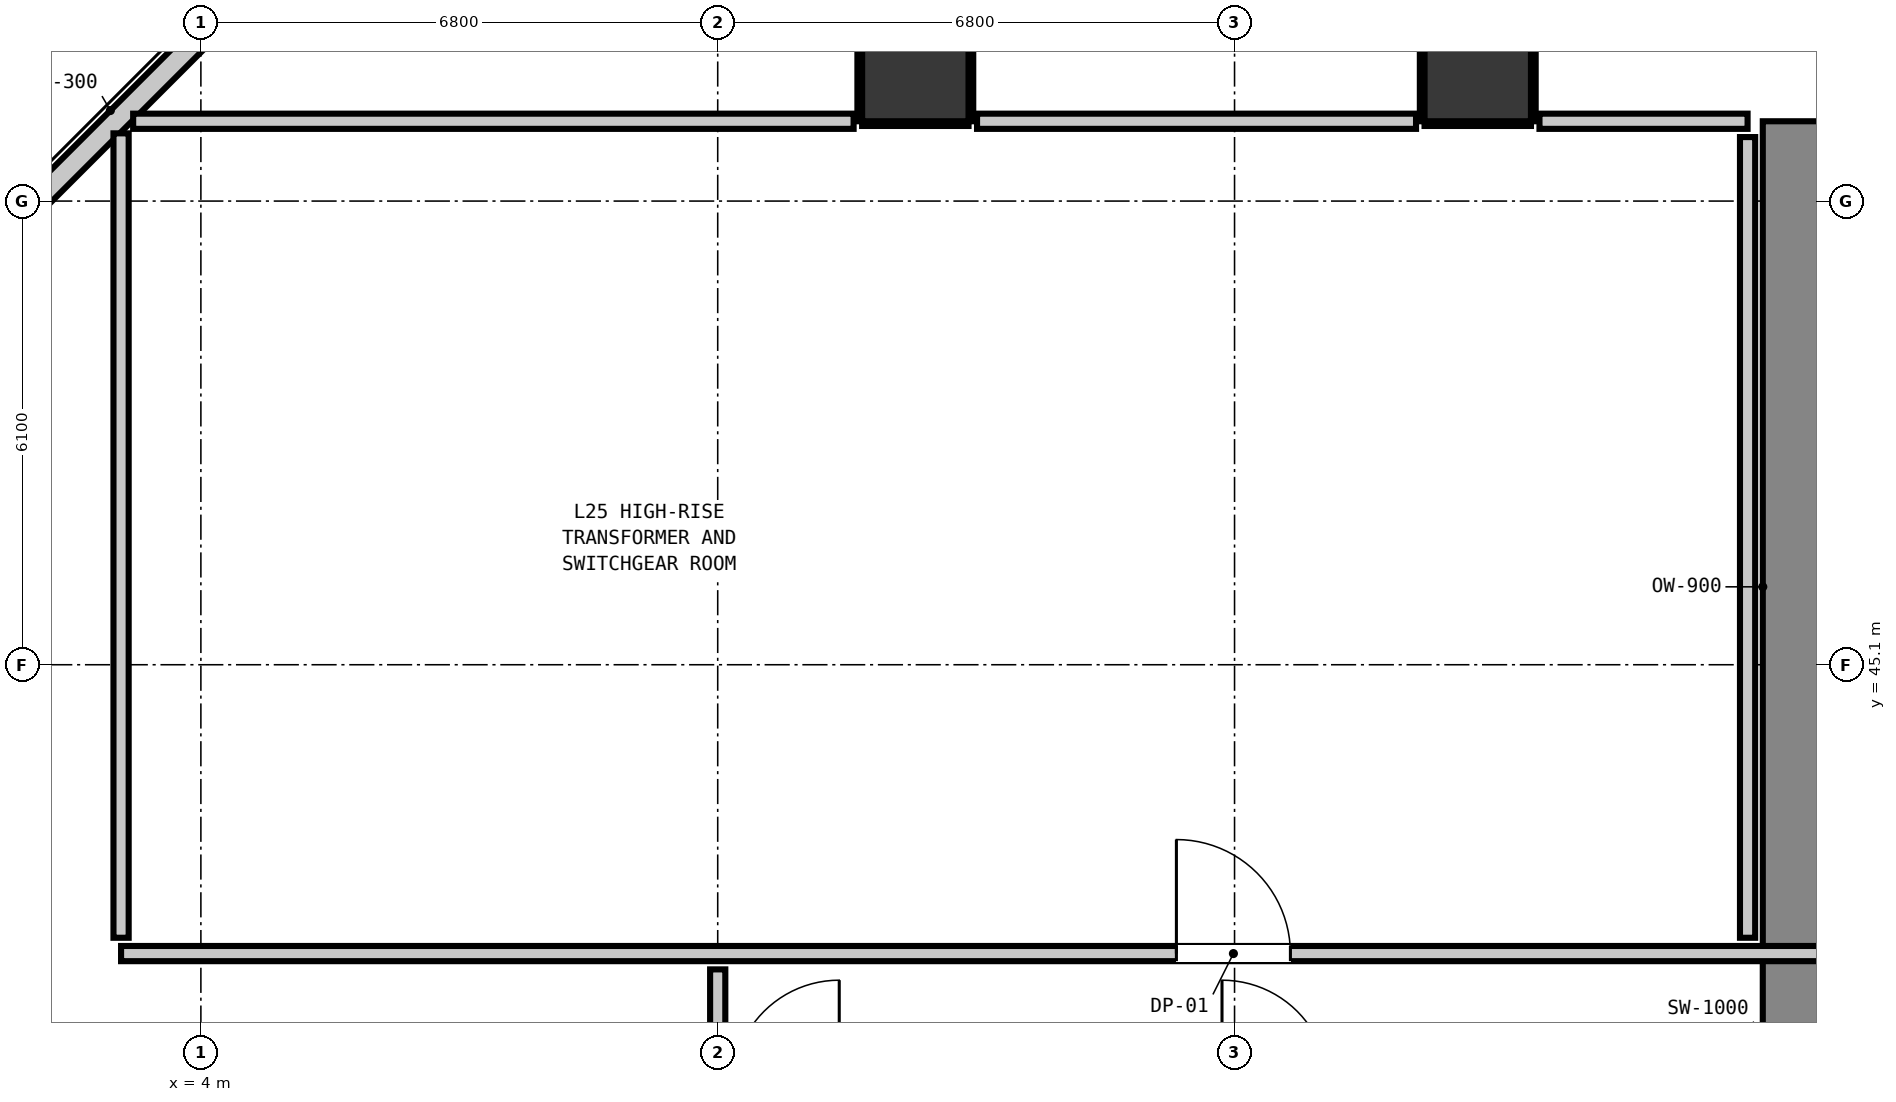
"""IFC4 building model, lengths in metres.
Left out: names, types, materials, properties, quantities, classifications, styles, units other than length and angle.
Written with IfcOpenShell. Run it as: python <this file> out.ifc"""

import sys

from ifc_helpers import new_model, si_unit, direction, frame, frame_2d, origin, origin_2d, place, context, subcontext, project, spatial, rectangle, extrude, element, fill, save


model = new_model("IFC4")
c1 = context("Model", 3, precision=1e-05, world=origin(), true_north=direction((0.0, 1.0)))
c2 = subcontext(c1, "Body", "Model", "MODEL_VIEW")
j1 = project(units=[si_unit("LENGTHUNIT", "METRE"), si_unit("PLANEANGLEUNIT", "RADIAN")], contexts=[c1])
p1 = place(None, origin())
s1 = spatial("IfcSite", under=j1, at=p1, CompositionType="ELEMENT")
p2 = place(p1, origin())
s2 = spatial("IfcBuilding", under=s1, at=p2, CompositionType="ELEMENT")
p3 = place(p2, frame((0.0, 0.0, 88.4)))
s3 = spatial("IfcBuildingStorey", under=s2, at=p3, CompositionType="ELEMENT", Elevation=88.4)
for number, where, z_axis, x_axis in (
    (1, (13.4, 52.95, 0.0), (0.0, 0.0, 1.0), (1.0, 0.0, 0.0)),
    (2, (20.8, 52.95, 0.0), (0.0, 0.0, 1.0), (1.0, 0.0, 0.0)),
):
    element("IfcColumn", number, at=place(p3, frame(where, z_axis=z_axis, x_axis=x_axis)), inside=s3, PredefinedType="COLUMN", context=c2, shape_type="SweptSolid", body=[
        extrude(rectangle(XDim=1.4, YDim=1.4, at=origin_2d()), origin(), (0.0, 0.0, 1.0), 4.4),
    ])
p4 = place(p3, frame((25.0, 40.0, 0.0), z_axis=(0.0, 0.0, 1.0), x_axis=(0.0, 1.0, 0.0)))
e3 = element("IfcWall", 3, at=p4, inside=s3, PredefinedType="SHEAR", context=c2, shape_type="SweptSolid", body=[
    extrude(rectangle(XDim=12.25, YDim=0.9, at=frame_2d((6.125, 0.0))), origin(), (0.0, 0.0, 1.0), 4.14),
])
p5 = place(p3, frame((1.665, 51.035, 0.0), z_axis=(0.0, 0.0, 1.0), x_axis=(0.707106781187, 0.707106781187, 0.0)))
e4 = element("IfcWall", 4, at=p5, inside=s3, PredefinedType="STANDARD", context=c2, shape_type="SweptSolid", body=[
    extrude(rectangle(XDim=3.536, YDim=0.3, at=frame_2d((1.768, 0.0))), origin(), (0.0, 0.0, 1.0), 4.14),
])
p6 = place(p3, frame((2.95, 41.3, 0.0), z_axis=(0.0, 0.0, 1.0), x_axis=(1.0, 0.0, 0.0)))
e5 = element("IfcWall", 5, at=p6, inside=s3, PredefinedType="PARTITIONING", context=c2, shape_type="SweptSolid", body=[
    extrude(rectangle(XDim=39.9, YDim=0.2, at=frame_2d((19.95, 0.0))), origin(), (0.0, 0.0, 1.0), 4.14),
])
p7 = place(p6, frame((26.25, 0.0, 0.0)))
e6 = element("IfcOpeningElement", 6, at=p7, cuts=e5, PredefinedType="OPENING", context=c2, shape_type="SweptSolid", body=[
    extrude(rectangle(XDim=1.5, YDim=2.15, at=frame_2d((0.75, 1.075))), frame((0.0, 0.11, 0.0), z_axis=(0.0, -1.0, 0.0), x_axis=(1.0, 0.0, 0.0)), (0.0, 0.0, 1.0), 0.22),
])
p8 = place(p6, frame((32.965, 0.0, 0.0)))
e7 = element("IfcOpeningElement", 7, at=p8, cuts=e5, PredefinedType="OPENING", context=c2, shape_type="SweptSolid", body=[
    extrude(rectangle(XDim=1.5, YDim=2.15, at=frame_2d((0.75, 1.075))), frame((0.0, 0.11, 0.0), z_axis=(0.0, -1.0, 0.0), x_axis=(1.0, 0.0, 0.0)), (0.0, 0.0, 1.0), 0.22),
])
p9 = place(p6, frame((13.885, 0.0, 0.0)))
e8 = element("IfcOpeningElement", 8, at=p9, cuts=e5, PredefinedType="OPENING", context=c2, shape_type="SweptSolid", body=[
    extrude(rectangle(XDim=1.5, YDim=2.15, at=frame_2d((0.75, 1.075))), frame((0.0, 0.11, 0.0), z_axis=(0.0, -1.0, 0.0), x_axis=(1.0, 0.0, 0.0)), (0.0, 0.0, 1.0), 0.22),
])
p10 = place(p3, frame((3.109, 52.25, 0.0), z_axis=(0.0, 0.0, 1.0), x_axis=(1.0, 0.0, 0.0)))
e9 = element("IfcWall", 9, at=p10, inside=s3, PredefinedType="PARTITIONING", context=c2, shape_type="SweptSolid", body=[
    extrude(rectangle(XDim=9.479, YDim=0.2, at=frame_2d((4.74, 0.0))), origin(), (0.0, 0.0, 1.0), 4.14),
])
p11 = place(p3, frame((14.212, 52.25, 0.0), z_axis=(0.0, 0.0, 1.0), x_axis=(1.0, 0.0, 0.0)))
e10 = element("IfcWall", 10, at=p11, inside=s3, PredefinedType="PARTITIONING", context=c2, shape_type="SweptSolid", body=[
    extrude(rectangle(XDim=5.776, YDim=0.2, at=frame_2d((2.888, 0.0))), origin(), (0.0, 0.0, 1.0), 4.14),
])
p12 = place(p3, frame((21.612, 52.25, 0.0), z_axis=(0.0, 0.0, 1.0), x_axis=(1.0, 0.0, 0.0)))
e11 = element("IfcWall", 11, at=p12, inside=s3, PredefinedType="PARTITIONING", context=c2, shape_type="SweptSolid", body=[
    extrude(rectangle(XDim=2.738, YDim=0.2, at=frame_2d((1.369, 0.0))), origin(), (0.0, 0.0, 1.0), 4.14),
])
p13 = place(p3, frame((2.95, 41.508, 0.0), z_axis=(0.0, 0.0, 1.0), x_axis=(0.0, 1.0, 0.0)))
e12 = element("IfcWall", 12, at=p13, inside=s3, PredefinedType="PARTITIONING", context=c2, shape_type="SweptSolid", body=[
    extrude(rectangle(XDim=10.583, YDim=0.2, at=frame_2d((5.292, 0.0))), origin(), (0.0, 0.0, 1.0), 4.14),
])
p14 = place(p3, frame((10.8, 39.748, 0.0), z_axis=(0.0, 0.0, 1.0), x_axis=(0.0, 1.0, 0.0)))
e13 = element("IfcWall", 13, at=p14, inside=s3, PredefinedType="PARTITIONING", context=c2, shape_type="SweptSolid", body=[
    extrude(rectangle(XDim=1.344, YDim=0.2, at=frame_2d((0.672, 0.0))), origin(), (0.0, 0.0, 1.0), 4.14),
])
p15 = place(p3, frame((24.35, 41.508, 0.0), z_axis=(0.0, 0.0, 1.0), x_axis=(0.0, 1.0, 0.0)))
e14 = element("IfcWall", 14, at=p15, inside=s3, PredefinedType="PARTITIONING", context=c2, shape_type="SweptSolid", body=[
    extrude(rectangle(XDim=10.534, YDim=0.2, at=frame_2d((5.267, 0.0))), origin(), (0.0, 0.0, 1.0), 4.14),
])
p16 = place(p3, frame((12.7, 52.218, 0.0), z_axis=(0.0, 0.0, 1.0), x_axis=(1.0, 0.0, 0.0)))
e15 = element("IfcWall", 15, at=p16, inside=s3, PredefinedType="PARTITIONING", context=c2, shape_type="SweptSolid", body=[
    extrude(rectangle(XDim=1.4, YDim=0.06, at=frame_2d((0.7, 0.0))), origin(), (0.0, 0.0, 1.0), 1.45),
])
for number, where, z_axis, x_axis in (
    (16, (12.668, 52.25, 0.0), (0.0, 0.0, 1.0), (0.0, 1.0, 0.0)),
    (17, (14.132, 52.25, 0.0), (0.0, 0.0, 1.0), (0.0, 1.0, 0.0)),
):
    element("IfcWall", number, at=place(p3, frame(where, z_axis=z_axis, x_axis=x_axis)), inside=s3, PredefinedType="PARTITIONING", context=c2, shape_type="SweptSolid", body=[
        extrude(rectangle(XDim=1.12, YDim=0.06, at=frame_2d((0.56, 0.0))), origin(), (0.0, 0.0, 1.0), 1.45),
    ])
p17 = place(p3, frame((20.1, 52.218, 0.0), z_axis=(0.0, 0.0, 1.0), x_axis=(1.0, 0.0, 0.0)))
e18 = element("IfcWall", 18, at=p17, inside=s3, PredefinedType="PARTITIONING", context=c2, shape_type="SweptSolid", body=[
    extrude(rectangle(XDim=1.4, YDim=0.06, at=frame_2d((0.7, 0.0))), origin(), (0.0, 0.0, 1.0), 1.45),
])
for number, where, z_axis, x_axis in (
    (19, (20.068, 52.25, 0.0), (0.0, 0.0, 1.0), (0.0, 1.0, 0.0)),
    (20, (21.532, 52.25, 0.0), (0.0, 0.0, 1.0), (0.0, 1.0, 0.0)),
):
    element("IfcWall", number, at=place(p3, frame(where, z_axis=z_axis, x_axis=x_axis)), inside=s3, PredefinedType="PARTITIONING", context=c2, shape_type="SweptSolid", body=[
        extrude(rectangle(XDim=1.12, YDim=0.06, at=frame_2d((0.56, 0.0))), origin(), (0.0, 0.0, 1.0), 1.45),
    ])
p18 = place(p9, origin())
e21 = element("IfcDoor", 21, at=p18, inside=s3, OperationType="SINGLE_SWING_LEFT", PredefinedType="DOOR", context=c2, shape_type="SweptSolid", body=[
    extrude(rectangle(XDim=1.5, YDim=2.15, at=frame_2d((0.75, 1.075))), frame((0.0, 0.025, 0.0), z_axis=(0.0, -1.0, 0.0), x_axis=(1.0, 0.0, 0.0)), (0.0, 0.0, 1.0), 0.05),
])
fill(e8, e21)
save(model, sys.argv[1])
